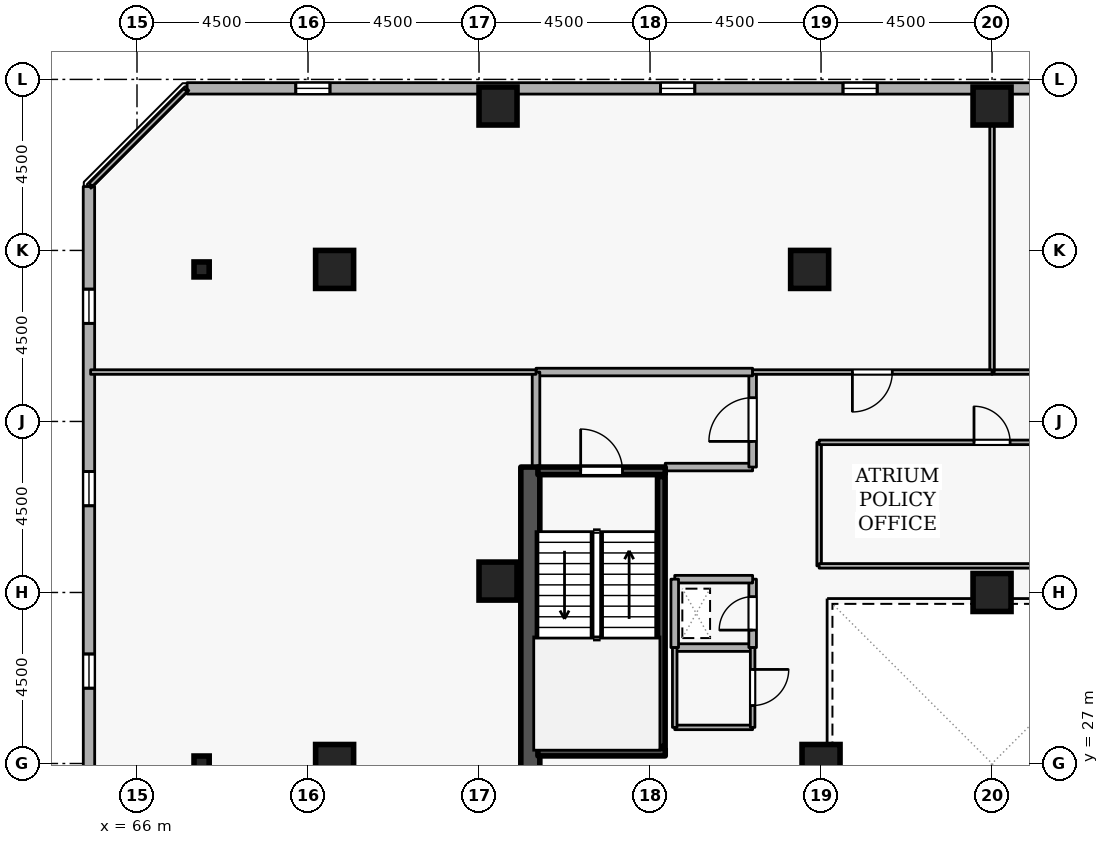
"""IFC4 building model, lengths in metres.
Left out: names, types, materials, properties, quantities, classifications, styles, units other than length and angle.
Written with IfcOpenShell. Run it as: python <this file> out.ifc"""

import sys

from ifc_helpers import new_model, si_unit, direction, frame, frame_2d, origin, origin_2d, place, context, subcontext, project, spatial, rectangle, i_section, extrude, element, fill, save


model = new_model("IFC4")
c1 = context("Model", 3, precision=1e-05, world=origin(), true_north=direction((0.0, 1.0)))
c2 = subcontext(c1, "Body", "Model", "MODEL_VIEW")
j1 = project(units=[si_unit("LENGTHUNIT", "METRE"), si_unit("PLANEANGLEUNIT", "RADIAN")], contexts=[c1])
p1 = place(None, origin())
s1 = spatial("IfcSite", under=j1, at=p1, CompositionType="ELEMENT")
p2 = place(p1, origin())
s2 = spatial("IfcBuilding", under=s1, at=p2, CompositionType="ELEMENT")
p3 = place(p2, frame((0.0, 0.0, 207.3)))
s3 = spatial("IfcBuildingStorey", under=s2, at=p3, CompositionType="ELEMENT", Elevation=207.3)
p4 = place(p3, frame((76.35, 19.2, 0.0), z_axis=(0.0, 0.0, 1.0), x_axis=(0.0, 1.0, 0.0)))
e1 = element("IfcWall", 1, at=p4, inside=s3, PredefinedType="SHEAR", context=c2, shape_type="SweptSolid", body=[
    extrude(rectangle(XDim=15.6, YDim=0.5, at=frame_2d((7.8, 0.0))), origin(), (0.0, 0.0, 1.0), 3.6),
])
for number, where, z_axis, x_axis in (
    (2, (88.5, 44.3, 0.0), (0.0, 0.0, 1.0), (1.0, 0.0, 0.0)),
    (3, (75.5, 44.3, 0.0), (0.0, 0.0, 1.0), (1.0, 0.0, 0.0)),
    (4, (71.2, 27.0, 0.0), (0.0, 0.0, 1.0), (1.0, 0.0, 0.0)),
    (5, (71.2, 40.0, 0.0), (0.0, 0.0, 1.0), (1.0, 0.0, 0.0)),
    (6, (83.7, 40.0, 0.0), (0.0, 0.0, 1.0), (1.0, 0.0, 0.0)),
    (7, (75.5, 31.8, 0.0), (0.0, 0.0, 1.0), (1.0, 0.0, 0.0)),
    (8, (84.0, 27.0, 0.0), (0.0, 0.0, 1.0), (1.0, 0.0, 0.0)),
    (9, (88.5, 31.5, 0.0), (0.0, 0.0, 1.0), (1.0, 0.0, 0.0)),
):
    element("IfcColumn", number, at=place(p3, frame(where, z_axis=z_axis, x_axis=x_axis)), inside=s3, PredefinedType="COLUMN", context=c2, shape_type="SweptSolid", body=[
        extrude(rectangle(XDim=1.0, YDim=1.0, at=origin_2d()), origin(), (0.0, 0.0, 1.0), 3.6),
    ])
for number, where, z_axis, x_axis in (
    (10, (67.7, 27.0, 0.0), (0.0, 0.0, 1.0), (1.0, 0.0, 0.0)),
    (11, (67.7, 40.0, 0.0), (0.0, 0.0, 1.0), (1.0, 0.0, 0.0)),
):
    element("IfcColumn", number, at=place(p3, frame(where, z_axis=z_axis, x_axis=x_axis)), inside=s3, PredefinedType="COLUMN", context=c2, shape_type="SweptSolid", body=[
        extrude(i_section(OverallWidth=0.399, OverallDepth=0.394, WebThickness=0.023, FlangeThickness=0.037, FilletRadius=0.015, at=origin_2d()), origin(), (0.0, 0.0, 1.0), 3.6),
    ])
p5 = place(p3, frame((102.578, 44.761, 0.0), z_axis=(0.0, 0.0, 1.0), x_axis=(-0.999999994606, 0.000103863011, 0.0)))
e12 = element("IfcWall", 12, at=p5, inside=s3, PredefinedType="STANDARD", context=c2, shape_type="SweptSolid", body=[
    extrude(rectangle(XDim=35.259, YDim=0.3, at=frame_2d((17.629, 0.0))), origin(), (0.0, 0.0, 1.0), 2.7),
])
p6 = place(p5, frame((2.7, 0.0, 0.72)))
e13 = element("IfcOpeningElement", 13, at=p6, cuts=e12, PredefinedType="OPENING", context=c2, shape_type="SweptSolid", body=[
    extrude(rectangle(XDim=0.9, YDim=1.75, at=frame_2d((0.45, 0.875))), frame((0.0, 0.16, 0.0), z_axis=(0.0, -1.0, 0.0), x_axis=(1.0, 0.0, 0.0)), (0.0, 0.0, 1.0), 0.32),
])
p7 = place(p5, frame((7.5, 0.0, 0.72)))
e14 = element("IfcOpeningElement", 14, at=p7, cuts=e12, PredefinedType="OPENING", context=c2, shape_type="SweptSolid", body=[
    extrude(rectangle(XDim=0.9, YDim=1.75, at=frame_2d((0.45, 0.875))), frame((0.0, 0.16, 0.0), z_axis=(0.0, -1.0, 0.0), x_axis=(1.0, 0.0, 0.0)), (0.0, 0.0, 1.0), 0.32),
])
p8 = place(p5, frame((17.1, 0.0, 0.72)))
e15 = element("IfcOpeningElement", 15, at=p8, cuts=e12, PredefinedType="OPENING", context=c2, shape_type="SweptSolid", body=[
    extrude(rectangle(XDim=0.9, YDim=1.75, at=frame_2d((0.45, 0.875))), frame((0.0, 0.16, 0.0), z_axis=(0.0, -1.0, 0.0), x_axis=(1.0, 0.0, 0.0)), (0.0, 0.0, 1.0), 0.32),
])
p9 = place(p5, frame((21.9, 0.0, 0.72)))
e16 = element("IfcOpeningElement", 16, at=p9, cuts=e12, PredefinedType="OPENING", context=c2, shape_type="SweptSolid", body=[
    extrude(rectangle(XDim=0.9, YDim=1.75, at=frame_2d((0.45, 0.875))), frame((0.0, 0.16, 0.0), z_axis=(0.0, -1.0, 0.0), x_axis=(1.0, 0.0, 0.0)), (0.0, 0.0, 1.0), 0.32),
])
p10 = place(p5, frame((31.5, 0.0, 0.72)))
e17 = element("IfcOpeningElement", 17, at=p10, cuts=e12, PredefinedType="OPENING", context=c2, shape_type="SweptSolid", body=[
    extrude(rectangle(XDim=0.9, YDim=1.75, at=frame_2d((0.45, 0.875))), frame((0.0, 0.16, 0.0), z_axis=(0.0, -1.0, 0.0), x_axis=(1.0, 0.0, 0.0)), (0.0, 0.0, 1.0), 0.32),
])
p11 = place(p3, frame((64.735, 42.181, 0.0), z_axis=(0.0, 0.0, 1.0), x_axis=(0.000103863011, -0.999999994606, 0.0)))
e18 = element("IfcWall", 18, at=p11, inside=s3, PredefinedType="STANDARD", context=c2, shape_type="SweptSolid", body=[
    extrude(rectangle(XDim=35.259, YDim=0.3, at=frame_2d((17.629, 0.0))), origin(), (0.0, 0.0, 1.0), 2.7),
])
p12 = place(p11, frame((2.7, 0.0, 0.72)))
e19 = element("IfcOpeningElement", 19, at=p12, cuts=e18, PredefinedType="OPENING", context=c2, shape_type="SweptSolid", body=[
    extrude(rectangle(XDim=0.9, YDim=1.75, at=frame_2d((0.45, 0.875))), frame((0.0, 0.16, 0.0), z_axis=(0.0, -1.0, 0.0), x_axis=(1.0, 0.0, 0.0)), (0.0, 0.0, 1.0), 0.32),
])
p13 = place(p11, frame((7.5, 0.0, 0.72)))
e20 = element("IfcOpeningElement", 20, at=p13, cuts=e18, PredefinedType="OPENING", context=c2, shape_type="SweptSolid", body=[
    extrude(rectangle(XDim=0.9, YDim=1.75, at=frame_2d((0.45, 0.875))), frame((0.0, 0.16, 0.0), z_axis=(0.0, -1.0, 0.0), x_axis=(1.0, 0.0, 0.0)), (0.0, 0.0, 1.0), 0.32),
])
p14 = place(p11, frame((12.3, 0.0, 0.72)))
e21 = element("IfcOpeningElement", 21, at=p14, cuts=e18, PredefinedType="OPENING", context=c2, shape_type="SweptSolid", body=[
    extrude(rectangle(XDim=0.9, YDim=1.75, at=frame_2d((0.45, 0.875))), frame((0.0, 0.16, 0.0), z_axis=(0.0, -1.0, 0.0), x_axis=(1.0, 0.0, 0.0)), (0.0, 0.0, 1.0), 0.32),
])
p15 = place(p11, frame((17.1, 0.0, 0.72)))
e22 = element("IfcOpeningElement", 22, at=p15, cuts=e18, PredefinedType="OPENING", context=c2, shape_type="SweptSolid", body=[
    extrude(rectangle(XDim=0.9, YDim=1.75, at=frame_2d((0.45, 0.875))), frame((0.0, 0.16, 0.0), z_axis=(0.0, -1.0, 0.0), x_axis=(1.0, 0.0, 0.0)), (0.0, 0.0, 1.0), 0.32),
])
p16 = place(p11, frame((31.5, 0.0, 0.72)))
e23 = element("IfcOpeningElement", 23, at=p16, cuts=e18, PredefinedType="OPENING", context=c2, shape_type="SweptSolid", body=[
    extrude(rectangle(XDim=0.9, YDim=1.75, at=frame_2d((0.45, 0.875))), frame((0.0, 0.16, 0.0), z_axis=(0.0, -1.0, 0.0), x_axis=(1.0, 0.0, 0.0)), (0.0, 0.0, 1.0), 0.32),
])
p17 = place(p3, frame((76.55, 34.7, 0.0), z_axis=(0.0, 0.0, 1.0), x_axis=(1.0, 0.0, 0.0)))
e24 = element("IfcWall", 24, at=p17, inside=s3, PredefinedType="SHEAR", context=c2, shape_type="SweptSolid", body=[
    extrude(rectangle(XDim=3.35, YDim=0.2, at=frame_2d((1.675, 0.0))), origin(), (0.0, 0.0, 1.0), 3.6),
])
p18 = place(p17, frame((1.125, 0.0, 0.0)))
e25 = element("IfcOpeningElement", 25, at=p18, cuts=e24, PredefinedType="OPENING", context=c2, shape_type="SweptSolid", body=[
    extrude(rectangle(XDim=1.1, YDim=2.1, at=frame_2d((0.55, 1.05))), frame((0.0, 0.11, 0.0), z_axis=(0.0, -1.0, 0.0), x_axis=(1.0, 0.0, 0.0)), (0.0, 0.0, 1.0), 0.22),
])
p19 = place(p3, frame((79.9, 27.3, 0.0), z_axis=(0.0, 0.0, 1.0), x_axis=(-1.0, 0.0, 0.0)))
e26 = element("IfcWall", 26, at=p19, inside=s3, PredefinedType="SHEAR", context=c2, shape_type="SweptSolid", body=[
    extrude(rectangle(XDim=3.35, YDim=0.2, at=frame_2d((1.675, 0.0))), origin(), (0.0, 0.0, 1.0), 3.6),
])
p20 = place(p3, frame((79.797, 27.45, 0.0), z_axis=(0.0, 0.0, 1.0), x_axis=(0.0, 1.0, 0.0)))
e27 = element("IfcWall", 27, at=p20, inside=s3, PredefinedType="SHEAR", context=c2, shape_type="SweptSolid", body=[
    extrude(rectangle(XDim=7.1, YDim=0.2, at=frame_2d((3.55, 0.0))), origin(), (0.0, 0.0, 1.0), 3.6),
])
p21 = place(p3, frame((79.9, 34.8, 0.0), z_axis=(0.0, 0.0, 1.0), x_axis=(1.0, 0.0, 0.0)))
e28 = element("IfcWall", 28, at=p21, inside=s3, PredefinedType="STANDARD", context=c2, shape_type="SweptSolid", body=[
    extrude(rectangle(XDim=2.3, YDim=0.2, at=frame_2d((1.15, 0.0))), origin(), (0.0, 0.0, 1.0), 2.545),
])
p22 = place(p3, frame((82.2, 34.8, 0.0), z_axis=(0.0, 0.0, 1.0), x_axis=(0.0, 1.0, 0.0)))
e29 = element("IfcWall", 29, at=p22, inside=s3, PredefinedType="STANDARD", context=c2, shape_type="SweptSolid", body=[
    extrude(rectangle(XDim=2.5, YDim=0.2, at=frame_2d((1.25, 0.0))), origin(), (0.0, 0.0, 1.0), 3.34),
])
p23 = place(p22, frame((0.675, 0.0, 0.0)))
e30 = element("IfcOpeningElement", 30, at=p23, cuts=e29, PredefinedType="OPENING", context=c2, shape_type="SweptSolid", body=[
    extrude(rectangle(XDim=1.15, YDim=2.1, at=frame_2d((0.575, 1.05))), frame((0.0, 0.11, 0.0), z_axis=(0.0, -1.0, 0.0), x_axis=(1.0, 0.0, 0.0)), (0.0, 0.0, 1.0), 0.22),
])
p24 = place(p3, frame((82.2, 37.3, 0.0), z_axis=(0.0, 0.0, 1.0), x_axis=(-1.0, 0.0, 0.0)))
e31 = element("IfcWall", 31, at=p24, inside=s3, PredefinedType="STANDARD", context=c2, shape_type="SweptSolid", body=[
    extrude(rectangle(XDim=5.7, YDim=0.2, at=frame_2d((2.85, 0.0))), origin(), (0.0, 0.0, 1.0), 3.34),
])
p25 = place(p3, frame((76.5, 37.3, 0.0), z_axis=(0.0, 0.0, 1.0), x_axis=(0.0, -1.0, 0.0)))
e32 = element("IfcWall", 32, at=p25, inside=s3, PredefinedType="STANDARD", context=c2, shape_type="SweptSolid", body=[
    extrude(rectangle(XDim=2.5, YDim=0.2, at=frame_2d((1.25, 0.0))), origin(), (0.0, 0.0, 1.0), 3.34),
])
p26 = place(p3, frame((80.15, 30.05, 0.0), z_axis=(0.0, 0.0, 1.0), x_axis=(1.0, 0.0, 0.0)))
e33 = element("IfcWall", 33, at=p26, inside=s3, PredefinedType="STANDARD", context=c2, shape_type="SweptSolid", body=[
    extrude(rectangle(XDim=2.05, YDim=0.2, at=frame_2d((1.025, 0.0))), origin(), (0.0, 0.0, 1.0), 3.34),
])
p27 = place(p3, frame((82.2, 30.05, 0.0), z_axis=(0.0, 0.0, 1.0), x_axis=(0.0, 1.0, 0.0)))
e34 = element("IfcWall", 34, at=p27, inside=s3, PredefinedType="STANDARD", context=c2, shape_type="SweptSolid", body=[
    extrude(rectangle(XDim=1.8, YDim=0.2, at=frame_2d((0.9, 0.0))), origin(), (0.0, 0.0, 1.0), 3.34),
])
p28 = place(p27, frame((0.46, 0.0, 0.0)))
e35 = element("IfcOpeningElement", 35, at=p28, cuts=e34, PredefinedType="OPENING", context=c2, shape_type="SweptSolid", body=[
    extrude(rectangle(XDim=0.88, YDim=2.04, at=frame_2d((0.44, 1.02))), frame((0.0, 0.11, 0.0), z_axis=(0.0, -1.0, 0.0), x_axis=(1.0, 0.0, 0.0)), (0.0, 0.0, 1.0), 0.22),
])
p29 = place(p3, frame((82.2, 31.85, 0.0), z_axis=(0.0, 0.0, 1.0), x_axis=(-1.0, 0.0, 0.0)))
e36 = element("IfcWall", 36, at=p29, inside=s3, PredefinedType="STANDARD", context=c2, shape_type="SweptSolid", body=[
    extrude(rectangle(XDim=2.05, YDim=0.2, at=frame_2d((1.025, 0.0))), origin(), (0.0, 0.0, 1.0), 3.34),
])
p30 = place(p3, frame((80.15, 31.85, 0.0), z_axis=(0.0, 0.0, 1.0), x_axis=(0.0, -1.0, 0.0)))
e37 = element("IfcWall", 37, at=p30, inside=s3, PredefinedType="STANDARD", context=c2, shape_type="SweptSolid", body=[
    extrude(rectangle(XDim=1.8, YDim=0.2, at=frame_2d((0.9, 0.0))), origin(), (0.0, 0.0, 1.0), 3.34),
])
p31 = place(p3, frame((82.2, 27.95, 0.0), z_axis=(0.0, 0.0, 1.0), x_axis=(-1.0, 0.0, 0.0)))
e38 = element("IfcWall", 38, at=p31, inside=s3, PredefinedType="PARTITIONING", context=c2, shape_type="SweptSolid", body=[
    extrude(rectangle(XDim=2.05, YDim=0.12, at=frame_2d((1.025, 0.0))), origin(), (0.0, 0.0, 1.0), 3.34),
])
p32 = place(p3, frame((80.15, 27.95, 0.0), z_axis=(0.0, 0.0, 1.0), x_axis=(0.0, 1.0, 0.0)))
e39 = element("IfcWall", 39, at=p32, inside=s3, PredefinedType="PARTITIONING", context=c2, shape_type="SweptSolid", body=[
    extrude(rectangle(XDim=2.1, YDim=0.12, at=frame_2d((1.05, 0.0))), origin(), (0.0, 0.0, 1.0), 3.34),
])
p33 = place(p3, frame((82.2, 30.05, 0.0), z_axis=(0.0, 0.0, 1.0), x_axis=(0.0, -1.0, 0.0)))
e40 = element("IfcWall", 40, at=p33, inside=s3, PredefinedType="PARTITIONING", context=c2, shape_type="SweptSolid", body=[
    extrude(rectangle(XDim=2.1, YDim=0.12, at=frame_2d((1.05, 0.0))), origin(), (0.0, 0.0, 1.0), 3.34),
])
p34 = place(p33, frame((0.575, 0.0, 0.0)))
e41 = element("IfcOpeningElement", 41, at=p34, cuts=e40, PredefinedType="OPENING", context=c2, shape_type="SweptSolid", body=[
    extrude(rectangle(XDim=0.95, YDim=2.1, at=frame_2d((0.475, 1.05))), frame((0.0, 0.07, 0.0), z_axis=(0.0, -1.0, 0.0), x_axis=(1.0, 0.0, 0.0)), (0.0, 0.0, 1.0), 0.14),
])
p35 = place(p3, frame((100.7, 37.3, 0.0), z_axis=(0.0, 0.0, 1.0), x_axis=(-1.0, 0.0, 0.0)))
e42 = element("IfcWall", 42, at=p35, inside=s3, PredefinedType="PARTITIONING", context=c2, shape_type="SweptSolid", body=[
    extrude(rectangle(XDim=12.2, YDim=0.12, at=frame_2d((6.1, 0.0))), origin(), (0.0, 0.0, 1.0), 3.34),
])
p36 = place(p35, frame((5.575, 0.0, 0.0)))
e43 = element("IfcOpeningElement", 43, at=p36, cuts=e42, PredefinedType="OPENING", context=c2, shape_type="SweptSolid", body=[
    extrude(rectangle(XDim=1.05, YDim=2.1, at=frame_2d((0.525, 1.05))), frame((0.0, 0.07, 0.0), z_axis=(0.0, -1.0, 0.0), x_axis=(1.0, 0.0, 0.0)), (0.0, 0.0, 1.0), 0.14),
])
p37 = place(p3, frame((88.5, 37.3, 0.0), z_axis=(0.0, 0.0, 1.0), x_axis=(0.0, 1.0, 0.0)))
e44 = element("IfcWall", 44, at=p37, inside=s3, PredefinedType="PARTITIONING", context=c2, shape_type="SweptSolid", body=[
    extrude(rectangle(XDim=7.42, YDim=0.12, at=frame_2d((3.71, 0.0))), origin(), (0.0, 0.0, 1.0), 2.932),
])
p38 = place(p3, frame((76.5, 37.3, 0.0), z_axis=(0.0, 0.0, 1.0), x_axis=(-1.0, 0.0, 0.0)))
e45 = element("IfcWall", 45, at=p38, inside=s3, PredefinedType="PARTITIONING", context=c2, shape_type="SweptSolid", body=[
    extrude(rectangle(XDim=11.72, YDim=0.12, at=frame_2d((5.86, 0.0))), origin(), (0.0, 0.0, 1.0), 3.34),
])
p39 = place(p3, frame((64.78, 42.225, 0.0), z_axis=(0.0, 0.0, 1.0), x_axis=(0.707106781187, 0.707106781187, 0.0)))
e46 = element("IfcWall", 46, at=p39, inside=s3, PredefinedType="PARTITIONING", context=c2, shape_type="SweptSolid", body=[
    extrude(rectangle(XDim=3.528, YDim=0.12, at=frame_2d((1.764, 0.0))), origin(), (0.0, 0.0, 1.0), 3.34),
])
p40 = place(p3, frame((88.5, 37.3, 0.0), z_axis=(0.0, 0.0, 1.0), x_axis=(-1.0, 0.0, 0.0)))
e47 = element("IfcWall", 47, at=p40, inside=s3, PredefinedType="PARTITIONING", context=c2, shape_type="SweptSolid", body=[
    extrude(rectangle(XDim=6.3, YDim=0.12, at=frame_2d((3.15, 0.0))), origin(), (0.0, 0.0, 1.0), 3.34),
])
p41 = place(p40, frame((2.625, 0.0, 0.0)))
e48 = element("IfcOpeningElement", 48, at=p41, cuts=e47, PredefinedType="OPENING", context=c2, shape_type="SweptSolid", body=[
    extrude(rectangle(XDim=1.05, YDim=2.1, at=frame_2d((0.525, 1.05))), frame((0.0, 0.07, 0.0), z_axis=(0.0, -1.0, 0.0), x_axis=(1.0, 0.0, 0.0)), (0.0, 0.0, 1.0), 0.14),
])
p42 = place(p3, frame((83.95, 32.2, 0.0), z_axis=(0.0, 0.0, 1.0), x_axis=(0.0, 1.0, 0.0)))
e49 = element("IfcWall", 49, at=p42, inside=s3, PredefinedType="PARTITIONING", context=c2, shape_type="SweptSolid", body=[
    extrude(rectangle(XDim=3.25, YDim=0.12, at=frame_2d((1.625, 0.0))), origin(), (0.0, 0.0, 1.0), 3.34),
])
p43 = place(p3, frame((83.95, 35.45, 0.0), z_axis=(0.0, 0.0, 1.0), x_axis=(1.0, 0.0, 0.0)))
e50 = element("IfcWall", 50, at=p43, inside=s3, PredefinedType="PARTITIONING", context=c2, shape_type="SweptSolid", body=[
    extrude(rectangle(XDim=9.1, YDim=0.12, at=frame_2d((4.55, 0.0))), origin(), (0.0, 0.0, 1.0), 3.34),
])
p44 = place(p43, frame((4.075, 0.0, 0.0)))
e51 = element("IfcOpeningElement", 51, at=p44, cuts=e50, PredefinedType="OPENING", context=c2, shape_type="SweptSolid", body=[
    extrude(rectangle(XDim=0.95, YDim=2.1, at=frame_2d((0.475, 1.05))), frame((0.0, 0.07, 0.0), z_axis=(0.0, -1.0, 0.0), x_axis=(1.0, 0.0, 0.0)), (0.0, 0.0, 1.0), 0.14),
])
p45 = place(p3, frame((93.05, 32.2, 0.0), z_axis=(0.0, 0.0, 1.0), x_axis=(-1.0, 0.0, 0.0)))
e52 = element("IfcWall", 52, at=p45, inside=s3, PredefinedType="PARTITIONING", context=c2, shape_type="SweptSolid", body=[
    extrude(rectangle(XDim=9.1, YDim=0.12, at=frame_2d((4.55, 0.0))), origin(), (0.0, 0.0, 1.0), 3.34),
])
p46 = place(p8, origin())
e53 = element("IfcWindow", 53, at=p46, inside=s3, PartitioningType="SINGLE_PANEL", PredefinedType="WINDOW", context=c2, shape_type="SweptSolid", body=[
    extrude(rectangle(XDim=0.9, YDim=1.75, at=frame_2d((0.45, 0.875))), frame((0.0, 0.03, 0.0), z_axis=(0.0, -1.0, 0.0), x_axis=(1.0, 0.0, 0.0)), (0.0, 0.0, 1.0), 0.06),
])
fill(e15, e53)
p47 = place(p9, origin())
e54 = element("IfcWindow", 54, at=p47, inside=s3, PartitioningType="SINGLE_PANEL", PredefinedType="WINDOW", context=c2, shape_type="SweptSolid", body=[
    extrude(rectangle(XDim=0.9, YDim=1.75, at=frame_2d((0.45, 0.875))), frame((0.0, 0.03, 0.0), z_axis=(0.0, -1.0, 0.0), x_axis=(1.0, 0.0, 0.0)), (0.0, 0.0, 1.0), 0.06),
])
fill(e16, e54)
p48 = place(p10, origin())
e55 = element("IfcWindow", 55, at=p48, inside=s3, PartitioningType="SINGLE_PANEL", PredefinedType="WINDOW", context=c2, shape_type="SweptSolid", body=[
    extrude(rectangle(XDim=0.9, YDim=1.75, at=frame_2d((0.45, 0.875))), frame((0.0, 0.03, 0.0), z_axis=(0.0, -1.0, 0.0), x_axis=(1.0, 0.0, 0.0)), (0.0, 0.0, 1.0), 0.06),
])
fill(e17, e55)
p49 = place(p12, origin())
e56 = element("IfcWindow", 56, at=p49, inside=s3, PartitioningType="SINGLE_PANEL", PredefinedType="WINDOW", context=c2, shape_type="SweptSolid", body=[
    extrude(rectangle(XDim=0.9, YDim=1.75, at=frame_2d((0.45, 0.875))), frame((0.0, 0.03, 0.0), z_axis=(0.0, -1.0, 0.0), x_axis=(1.0, 0.0, 0.0)), (0.0, 0.0, 1.0), 0.06),
])
fill(e19, e56)
p50 = place(p13, origin())
e57 = element("IfcWindow", 57, at=p50, inside=s3, PartitioningType="SINGLE_PANEL", PredefinedType="WINDOW", context=c2, shape_type="SweptSolid", body=[
    extrude(rectangle(XDim=0.9, YDim=1.75, at=frame_2d((0.45, 0.875))), frame((0.0, 0.03, 0.0), z_axis=(0.0, -1.0, 0.0), x_axis=(1.0, 0.0, 0.0)), (0.0, 0.0, 1.0), 0.06),
])
fill(e20, e57)
p51 = place(p14, origin())
e58 = element("IfcWindow", 58, at=p51, inside=s3, PartitioningType="SINGLE_PANEL", PredefinedType="WINDOW", context=c2, shape_type="SweptSolid", body=[
    extrude(rectangle(XDim=0.9, YDim=1.75, at=frame_2d((0.45, 0.875))), frame((0.0, 0.03, 0.0), z_axis=(0.0, -1.0, 0.0), x_axis=(1.0, 0.0, 0.0)), (0.0, 0.0, 1.0), 0.06),
])
fill(e21, e58)
p52 = place(p18, origin())
e59 = element("IfcDoor", 59, at=p52, inside=s3, OperationType="SINGLE_SWING_LEFT", PredefinedType="DOOR", context=c2, shape_type="SweptSolid", body=[
    extrude(rectangle(XDim=1.1, YDim=2.1, at=frame_2d((0.55, 1.05))), frame((0.0, 0.025, 0.0), z_axis=(0.0, -1.0, 0.0), x_axis=(1.0, 0.0, 0.0)), (0.0, 0.0, 1.0), 0.05),
])
fill(e25, e59)
p53 = place(p23, origin())
e60 = element("IfcDoor", 60, at=p53, inside=s3, OperationType="SINGLE_SWING_LEFT", PredefinedType="DOOR", context=c2, shape_type="SweptSolid", body=[
    extrude(rectangle(XDim=1.15, YDim=2.1, at=frame_2d((0.575, 1.05))), frame((0.0, 0.025, 0.0), z_axis=(0.0, -1.0, 0.0), x_axis=(1.0, 0.0, 0.0)), (0.0, 0.0, 1.0), 0.05),
])
fill(e30, e60)
p54 = place(p28, origin())
e61 = element("IfcDoor", 61, at=p54, inside=s3, OperationType="SINGLE_SWING_LEFT", PredefinedType="DOOR", context=c2, shape_type="SweptSolid", body=[
    extrude(rectangle(XDim=0.88, YDim=2.04, at=frame_2d((0.44, 1.02))), frame((0.0, 0.025, 0.0), z_axis=(0.0, -1.0, 0.0), x_axis=(1.0, 0.0, 0.0)), (0.0, 0.0, 1.0), 0.05),
])
fill(e35, e61)
p55 = place(p34, origin())
e62 = element("IfcDoor", 62, at=p55, inside=s3, OperationType="SINGLE_SWING_LEFT", PredefinedType="DOOR", context=c2, shape_type="SweptSolid", body=[
    extrude(rectangle(XDim=0.95, YDim=2.1, at=frame_2d((0.475, 1.05))), frame((0.0, 0.025, 0.0), z_axis=(0.0, -1.0, 0.0), x_axis=(1.0, 0.0, 0.0)), (0.0, 0.0, 1.0), 0.05),
])
fill(e41, e62)
p56 = place(p41, origin())
e63 = element("IfcDoor", 63, at=p56, inside=s3, OperationType="SINGLE_SWING_RIGHT", PredefinedType="DOOR", context=c2, shape_type="SweptSolid", body=[
    extrude(rectangle(XDim=1.05, YDim=2.1, at=frame_2d((0.525, 1.05))), frame((0.0, 0.025, 0.0), z_axis=(0.0, -1.0, 0.0), x_axis=(1.0, 0.0, 0.0)), (0.0, 0.0, 1.0), 0.05),
])
fill(e48, e63)
p57 = place(p44, origin())
e64 = element("IfcDoor", 64, at=p57, inside=s3, OperationType="SINGLE_SWING_LEFT", PredefinedType="DOOR", context=c2, shape_type="SweptSolid", body=[
    extrude(rectangle(XDim=0.95, YDim=2.1, at=frame_2d((0.475, 1.05))), frame((0.0, 0.025, 0.0), z_axis=(0.0, -1.0, 0.0), x_axis=(1.0, 0.0, 0.0)), (0.0, 0.0, 1.0), 0.05),
])
fill(e51, e64)
save(model, sys.argv[1])
